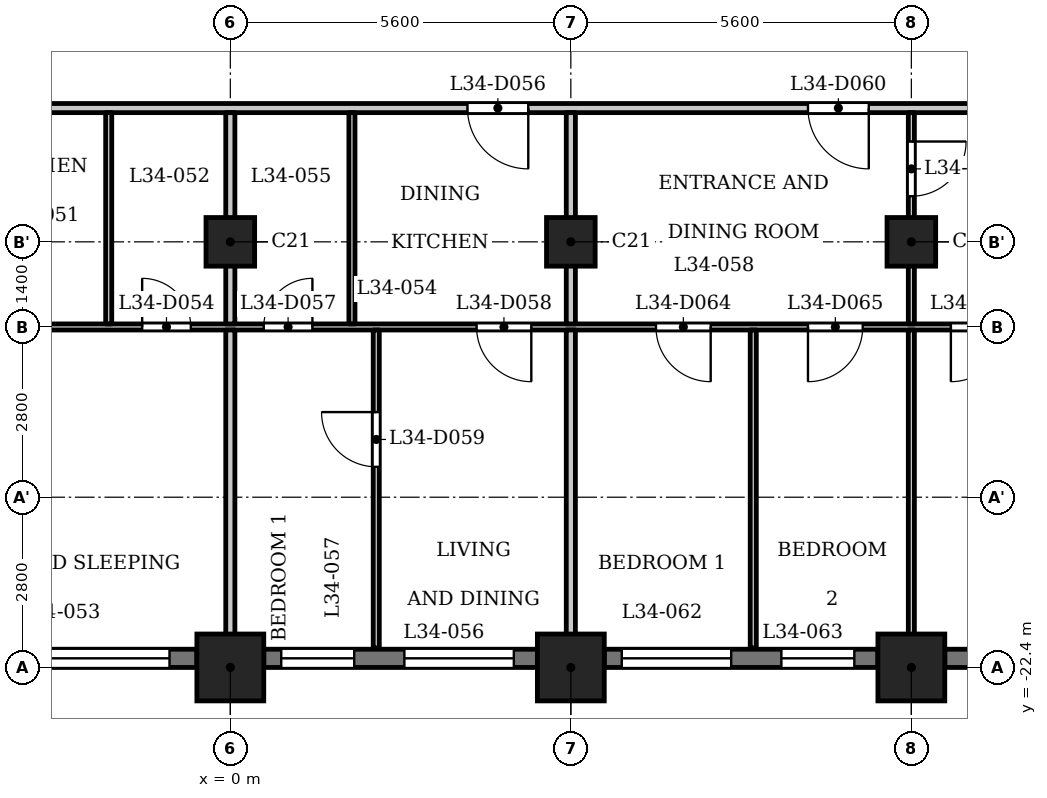
"""IFC4 building model, lengths in metres.
Left out: names, types, materials, properties, quantities, classifications, styles, units other than length and angle.
Written with IfcOpenShell. Run it as: python <this file> out.ifc"""

import sys

from ifc_helpers import new_model, si_unit, direction, frame, frame_2d, origin, origin_2d, place, context, subcontext, project, spatial, rectangle, extrude, element, fill, save


model = new_model("IFC4")
c1 = context("Model", 3, precision=1e-05, world=origin(), true_north=direction((0.0, 1.0)))
c2 = subcontext(c1, "Body", "Model", "MODEL_VIEW")
j1 = project(units=[si_unit("LENGTHUNIT", "METRE"), si_unit("PLANEANGLEUNIT", "RADIAN")], contexts=[c1])
p1 = place(None, origin())
s1 = spatial("IfcSite", under=j1, at=p1, CompositionType="ELEMENT")
p2 = place(p1, origin())
s2 = spatial("IfcBuilding", under=s1, at=p2, CompositionType="ELEMENT")
p3 = place(p2, frame((0.0, 0.0, 136.1)))
s3 = spatial("IfcBuildingStorey", under=s2, at=p3, CompositionType="ELEMENT", Elevation=136.1)
for number, where, z_axis, x_axis in (
    (1, (0.0, -22.4, 0.0), (0.0, 0.0, 1.0), (1.0, 0.0, 0.0)),
    (2, (5.6, -22.4, 0.0), (0.0, 0.0, 1.0), (1.0, 0.0, 0.0)),
    (3, (11.2, -22.4, 0.0), (0.0, 0.0, 1.0), (1.0, 0.0, 0.0)),
):
    element("IfcColumn", number, at=place(p3, frame(where, z_axis=z_axis, x_axis=x_axis)), inside=s3, PredefinedType="COLUMN", context=c2, shape_type="SweptSolid", body=[
        extrude(rectangle(XDim=1.1, YDim=1.1, at=origin_2d()), origin(), (0.0, 0.0, 1.0), 3.5),
    ])
for number, where, z_axis, x_axis in (
    (4, (0.0, -15.4, 0.0), (0.0, 0.0, 1.0), (1.0, 0.0, 0.0)),
    (5, (5.6, -15.4, 0.0), (0.0, 0.0, 1.0), (1.0, 0.0, 0.0)),
    (6, (11.2, -15.4, 0.0), (0.0, 0.0, 1.0), (1.0, 0.0, 0.0)),
):
    element("IfcColumn", number, at=place(p3, frame(where, z_axis=z_axis, x_axis=x_axis)), inside=s3, PredefinedType="COLUMN", context=c2, shape_type="SweptSolid", body=[
        extrude(rectangle(XDim=0.8, YDim=0.8, at=origin_2d()), origin(), (0.0, 0.0, 1.0), 3.5),
    ])
p4 = place(p3, frame((-5.05, -22.25, 0.0), z_axis=(0.0, 0.0, 1.0), x_axis=(1.0, 0.0, 0.0)))
e7 = element("IfcWall", 7, at=p4, inside=s3, PredefinedType="SOLIDWALL", context=c2, shape_type="SweptSolid", body=[
    extrude(rectangle(XDim=4.5, YDim=0.3, at=frame_2d((2.25, 0.0))), origin(), (0.0, 0.0, 1.0), 2.45),
])
p5 = place(p4, frame((0.45, 0.0, 1.2)))
e8 = element("IfcOpeningElement", 8, at=p5, cuts=e7, PredefinedType="OPENING", context=c2, shape_type="SweptSolid", body=[
    extrude(rectangle(XDim=3.6, YDim=0.95, at=frame_2d((1.8, 0.475))), frame((0.0, 0.16, 0.0), z_axis=(0.0, -1.0, 0.0), x_axis=(1.0, 0.0, 0.0)), (0.0, 0.0, 1.0), 0.32),
])
p6 = place(p3, frame((0.55, -22.25, 0.0), z_axis=(0.0, 0.0, 1.0), x_axis=(1.0, 0.0, 0.0)))
e9 = element("IfcWall", 9, at=p6, inside=s3, PredefinedType="SOLIDWALL", context=c2, shape_type="SweptSolid", body=[
    extrude(rectangle(XDim=4.5, YDim=0.3, at=frame_2d((2.25, 0.0))), origin(), (0.0, 0.0, 1.0), 2.45),
])
p7 = place(p6, frame((0.288, 0.0, 0.6)))
e10 = element("IfcOpeningElement", 10, at=p7, cuts=e9, PredefinedType="OPENING", context=c2, shape_type="SweptSolid", body=[
    extrude(rectangle(XDim=1.2, YDim=1.55, at=frame_2d((0.6, 0.775))), frame((0.0, 0.16, 0.0), z_axis=(0.0, -1.0, 0.0), x_axis=(1.0, 0.0, 0.0)), (0.0, 0.0, 1.0), 0.32),
])
p8 = place(p6, frame((2.312, 0.0, 0.9)))
e11 = element("IfcOpeningElement", 11, at=p8, cuts=e9, PredefinedType="OPENING", context=c2, shape_type="SweptSolid", body=[
    extrude(rectangle(XDim=1.8, YDim=1.25, at=frame_2d((0.9, 0.625))), frame((0.0, 0.16, 0.0), z_axis=(0.0, -1.0, 0.0), x_axis=(1.0, 0.0, 0.0)), (0.0, 0.0, 1.0), 0.32),
])
p9 = place(p3, frame((6.15, -22.25, 0.0), z_axis=(0.0, 0.0, 1.0), x_axis=(1.0, 0.0, 0.0)))
e12 = element("IfcWall", 12, at=p9, inside=s3, PredefinedType="SOLIDWALL", context=c2, shape_type="SweptSolid", body=[
    extrude(rectangle(XDim=4.5, YDim=0.3, at=frame_2d((2.25, 0.0))), origin(), (0.0, 0.0, 1.0), 2.45),
])
p10 = place(p9, frame((0.288, 0.0, 0.9)))
e13 = element("IfcOpeningElement", 13, at=p10, cuts=e12, PredefinedType="OPENING", context=c2, shape_type="SweptSolid", body=[
    extrude(rectangle(XDim=1.8, YDim=1.25, at=frame_2d((0.9, 0.625))), frame((0.0, 0.16, 0.0), z_axis=(0.0, -1.0, 0.0), x_axis=(1.0, 0.0, 0.0)), (0.0, 0.0, 1.0), 0.32),
])
p11 = place(p9, frame((2.913, 0.0, 0.6)))
e14 = element("IfcOpeningElement", 14, at=p11, cuts=e12, PredefinedType="OPENING", context=c2, shape_type="SweptSolid", body=[
    extrude(rectangle(XDim=1.2, YDim=1.55, at=frame_2d((0.6, 0.775))), frame((0.0, 0.16, 0.0), z_axis=(0.0, -1.0, 0.0), x_axis=(1.0, 0.0, 0.0)), (0.0, 0.0, 1.0), 0.32),
])
p12 = place(p3, frame((11.75, -22.25, 0.0), z_axis=(0.0, 0.0, 1.0), x_axis=(1.0, 0.0, 0.0)))
e15 = element("IfcWall", 15, at=p12, inside=s3, PredefinedType="SOLIDWALL", context=c2, shape_type="SweptSolid", body=[
    extrude(rectangle(XDim=4.5, YDim=0.3, at=frame_2d((2.25, 0.0))), origin(), (0.0, 0.0, 1.0), 2.45),
])
p13 = place(p12, frame((0.45, 0.0, 1.2)))
e16 = element("IfcOpeningElement", 16, at=p13, cuts=e15, PredefinedType="OPENING", context=c2, shape_type="SweptSolid", body=[
    extrude(rectangle(XDim=3.6, YDim=0.95, at=frame_2d((1.8, 0.475))), frame((0.0, 0.16, 0.0), z_axis=(0.0, -1.0, 0.0), x_axis=(1.0, 0.0, 0.0)), (0.0, 0.0, 1.0), 0.32),
])
p14 = place(p3, frame((-16.725, -16.8, 0.0), z_axis=(0.0, 0.0, 1.0), x_axis=(1.0, 0.0, 0.0)))
e17 = element("IfcWall", 17, at=p14, inside=s3, PredefinedType="PARTITIONING", context=c2, shape_type="SweptSolid", body=[
    extrude(rectangle(XDim=33.45, YDim=0.1, at=frame_2d((16.725, 0.0))), origin(), (0.0, 0.0, 1.0), 3.2),
])
p15 = place(p14, frame((0.575, 0.0, 0.0)))
e18 = element("IfcOpeningElement", 18, at=p15, cuts=e17, PredefinedType="OPENING", context=c2, shape_type="SweptSolid", body=[
    extrude(rectangle(XDim=0.8, YDim=2.1, at=frame_2d((0.4, 1.05))), frame((0.0, 0.06, 0.0), z_axis=(0.0, -1.0, 0.0), x_axis=(1.0, 0.0, 0.0)), (0.0, 0.0, 1.0), 0.12),
])
p16 = place(p14, frame((6.175, 0.0, 0.0)))
e19 = element("IfcOpeningElement", 19, at=p16, cuts=e17, PredefinedType="OPENING", context=c2, shape_type="SweptSolid", body=[
    extrude(rectangle(XDim=0.9, YDim=2.1, at=frame_2d((0.45, 1.05))), frame((0.0, 0.06, 0.0), z_axis=(0.0, -1.0, 0.0), x_axis=(1.0, 0.0, 0.0)), (0.0, 0.0, 1.0), 0.12),
])
p17 = place(p14, frame((15.275, 0.0, 0.0)))
e20 = element("IfcOpeningElement", 20, at=p17, cuts=e17, PredefinedType="OPENING", context=c2, shape_type="SweptSolid", body=[
    extrude(rectangle(XDim=0.8, YDim=2.1, at=frame_2d((0.4, 1.05))), frame((0.0, 0.06, 0.0), z_axis=(0.0, -1.0, 0.0), x_axis=(1.0, 0.0, 0.0)), (0.0, 0.0, 1.0), 0.12),
])
p18 = place(p14, frame((11.775, 0.0, 0.0)))
e21 = element("IfcOpeningElement", 21, at=p18, cuts=e17, PredefinedType="OPENING", context=c2, shape_type="SweptSolid", body=[
    extrude(rectangle(XDim=0.9, YDim=2.1, at=frame_2d((0.45, 1.05))), frame((0.0, 0.06, 0.0), z_axis=(0.0, -1.0, 0.0), x_axis=(1.0, 0.0, 0.0)), (0.0, 0.0, 1.0), 0.12),
])
p19 = place(p14, frame((17.275, 0.0, 0.0)))
e22 = element("IfcOpeningElement", 22, at=p19, cuts=e17, PredefinedType="OPENING", context=c2, shape_type="SweptSolid", body=[
    extrude(rectangle(XDim=0.8, YDim=2.1, at=frame_2d((0.4, 1.05))), frame((0.0, 0.06, 0.0), z_axis=(0.0, -1.0, 0.0), x_axis=(1.0, 0.0, 0.0)), (0.0, 0.0, 1.0), 0.12),
])
p20 = place(p14, frame((20.775, 0.0, 0.0)))
e23 = element("IfcOpeningElement", 23, at=p20, cuts=e17, PredefinedType="OPENING", context=c2, shape_type="SweptSolid", body=[
    extrude(rectangle(XDim=0.9, YDim=2.1, at=frame_2d((0.45, 1.05))), frame((0.0, 0.06, 0.0), z_axis=(0.0, -1.0, 0.0), x_axis=(1.0, 0.0, 0.0)), (0.0, 0.0, 1.0), 0.12),
])
p21 = place(p14, frame((31.575, 0.0, 0.0)))
e24 = element("IfcOpeningElement", 24, at=p21, cuts=e17, PredefinedType="OPENING", context=c2, shape_type="SweptSolid", body=[
    extrude(rectangle(XDim=0.8, YDim=2.1, at=frame_2d((0.4, 1.05))), frame((0.0, 0.06, 0.0), z_axis=(0.0, -1.0, 0.0), x_axis=(1.0, 0.0, 0.0)), (0.0, 0.0, 1.0), 0.12),
])
p22 = place(p14, frame((28.575, 0.0, 0.0)))
e25 = element("IfcOpeningElement", 25, at=p22, cuts=e17, PredefinedType="OPENING", context=c2, shape_type="SweptSolid", body=[
    extrude(rectangle(XDim=0.9, YDim=2.1, at=frame_2d((0.45, 1.05))), frame((0.0, 0.06, 0.0), z_axis=(0.0, -1.0, 0.0), x_axis=(1.0, 0.0, 0.0)), (0.0, 0.0, 1.0), 0.12),
])
p23 = place(p14, frame((23.725, 0.0, 0.0)))
e26 = element("IfcOpeningElement", 26, at=p23, cuts=e17, PredefinedType="OPENING", context=c2, shape_type="SweptSolid", body=[
    extrude(rectangle(XDim=0.9, YDim=2.1, at=frame_2d((0.45, 1.05))), frame((0.0, 0.06, 0.0), z_axis=(0.0, -1.0, 0.0), x_axis=(1.0, 0.0, 0.0)), (0.0, 0.0, 1.0), 0.12),
])
p24 = place(p14, frame((26.225, 0.0, 0.0)))
e27 = element("IfcOpeningElement", 27, at=p24, cuts=e17, PredefinedType="OPENING", context=c2, shape_type="SweptSolid", body=[
    extrude(rectangle(XDim=0.9, YDim=2.1, at=frame_2d((0.45, 1.05))), frame((0.0, 0.06, 0.0), z_axis=(0.0, -1.0, 0.0), x_axis=(1.0, 0.0, 0.0)), (0.0, 0.0, 1.0), 0.12),
])
p25 = place(p3, frame((-17.4, -13.2, 0.0), z_axis=(0.0, 0.0, 1.0), x_axis=(1.0, 0.0, 0.0)))
e28 = element("IfcWall", 28, at=p25, inside=s3, PredefinedType="PARTITIONING", context=c2, shape_type="SweptSolid", body=[
    extrude(rectangle(XDim=34.8, YDim=0.15, at=frame_2d((17.4, 0.0))), origin(), (0.0, 0.0, 1.0), 3.2),
])
p26 = place(p25, frame((0.15, 0.0, 0.0)))
e29 = element("IfcOpeningElement", 29, at=p26, cuts=e28, PredefinedType="OPENING", context=c2, shape_type="SweptSolid", body=[
    extrude(rectangle(XDim=1.0, YDim=2.1, at=frame_2d((0.5, 1.05))), frame((0.0, 0.085, 0.0), z_axis=(0.0, -1.0, 0.0), x_axis=(1.0, 0.0, 0.0)), (0.0, 0.0, 1.0), 0.17),
])
p27 = place(p25, frame((33.55, 0.0, 0.0)))
e30 = element("IfcOpeningElement", 30, at=p27, cuts=e28, PredefinedType="OPENING", context=c2, shape_type="SweptSolid", body=[
    extrude(rectangle(XDim=1.0, YDim=2.1, at=frame_2d((0.5, 1.05))), frame((0.0, 0.085, 0.0), z_axis=(0.0, -1.0, 0.0), x_axis=(1.0, 0.0, 0.0)), (0.0, 0.0, 1.0), 0.17),
])
p28 = place(p25, frame((6.85, 0.0, 0.0)))
e31 = element("IfcOpeningElement", 31, at=p28, cuts=e28, PredefinedType="OPENING", context=c2, shape_type="SweptSolid", body=[
    extrude(rectangle(XDim=1.0, YDim=2.1, at=frame_2d((0.5, 1.05))), frame((0.0, 0.085, 0.0), z_axis=(0.0, -1.0, 0.0), x_axis=(1.0, 0.0, 0.0)), (0.0, 0.0, 1.0), 0.17),
])
p29 = place(p25, frame((12.45, 0.0, 0.0)))
e32 = element("IfcOpeningElement", 32, at=p29, cuts=e28, PredefinedType="OPENING", context=c2, shape_type="SweptSolid", body=[
    extrude(rectangle(XDim=1.0, YDim=2.1, at=frame_2d((0.5, 1.05))), frame((0.0, 0.085, 0.0), z_axis=(0.0, -1.0, 0.0), x_axis=(1.0, 0.0, 0.0)), (0.0, 0.0, 1.0), 0.17),
])
p30 = place(p25, frame((21.3, 0.0, 0.0)))
e33 = element("IfcOpeningElement", 33, at=p30, cuts=e28, PredefinedType="OPENING", context=c2, shape_type="SweptSolid", body=[
    extrude(rectangle(XDim=1.0, YDim=2.1, at=frame_2d((0.5, 1.05))), frame((0.0, 0.085, 0.0), z_axis=(0.0, -1.0, 0.0), x_axis=(1.0, 0.0, 0.0)), (0.0, 0.0, 1.0), 0.17),
])
p31 = place(p25, frame((26.9, 0.0, 0.0)))
e34 = element("IfcOpeningElement", 34, at=p31, cuts=e28, PredefinedType="OPENING", context=c2, shape_type="SweptSolid", body=[
    extrude(rectangle(XDim=1.0, YDim=2.1, at=frame_2d((0.5, 1.05))), frame((0.0, 0.085, 0.0), z_axis=(0.0, -1.0, 0.0), x_axis=(1.0, 0.0, 0.0)), (0.0, 0.0, 1.0), 0.17),
])
p32 = place(p3, frame((-2.0, -16.75, 0.0), z_axis=(0.0, 0.0, 1.0), x_axis=(0.0, 1.0, 0.0)))
e35 = element("IfcWall", 35, at=p32, inside=s3, PredefinedType="PARTITIONING", context=c2, shape_type="SweptSolid", body=[
    extrude(rectangle(XDim=3.475, YDim=0.1, at=frame_2d((1.738, 0.0))), origin(), (0.0, 0.0, 1.0), 3.2),
])
p33 = place(p3, frame((0.0, -22.93, 0.0), z_axis=(0.0, 0.0, 1.0), x_axis=(0.0, 1.0, 0.0)))
e36 = element("IfcWall", 36, at=p33, inside=s3, PredefinedType="PARTITIONING", context=c2, shape_type="SweptSolid", body=[
    extrude(rectangle(XDim=6.08, YDim=0.15, at=frame_2d((3.04, 0.0))), origin(), (0.0, 0.0, 1.0), 3.2),
])
p34 = place(p3, frame((0.0, -16.75, 0.0), z_axis=(0.0, 0.0, 1.0), x_axis=(0.0, 1.0, 0.0)))
e37 = element("IfcWall", 37, at=p34, inside=s3, PredefinedType="PARTITIONING", context=c2, shape_type="SweptSolid", body=[
    extrude(rectangle(XDim=3.475, YDim=0.15, at=frame_2d((1.738, 0.0))), origin(), (0.0, 0.0, 1.0), 3.2),
])
p35 = place(p3, frame((2.0, -16.75, 0.0), z_axis=(0.0, 0.0, 1.0), x_axis=(0.0, 1.0, 0.0)))
e38 = element("IfcWall", 38, at=p35, inside=s3, PredefinedType="PARTITIONING", context=c2, shape_type="SweptSolid", body=[
    extrude(rectangle(XDim=3.475, YDim=0.1, at=frame_2d((1.738, 0.0))), origin(), (0.0, 0.0, 1.0), 3.2),
])
p36 = place(p3, frame((2.4, -22.08, 0.0), z_axis=(0.0, 0.0, 1.0), x_axis=(0.0, 1.0, 0.0)))
e39 = element("IfcWall", 39, at=p36, inside=s3, PredefinedType="PARTITIONING", context=c2, shape_type="SweptSolid", body=[
    extrude(rectangle(XDim=5.23, YDim=0.1, at=frame_2d((2.615, 0.0))), origin(), (0.0, 0.0, 1.0), 3.2),
])
p37 = place(p36, frame((2.98, 0.0, 0.0)))
e40 = element("IfcOpeningElement", 40, at=p37, cuts=e39, PredefinedType="OPENING", context=c2, shape_type="SweptSolid", body=[
    extrude(rectangle(XDim=0.9, YDim=2.1, at=frame_2d((0.45, 1.05))), frame((0.0, 0.06, 0.0), z_axis=(0.0, -1.0, 0.0), x_axis=(1.0, 0.0, 0.0)), (0.0, 0.0, 1.0), 0.12),
])
p38 = place(p3, frame((5.6, -22.93, 0.0), z_axis=(0.0, 0.0, 1.0), x_axis=(0.0, 1.0, 0.0)))
e41 = element("IfcWall", 41, at=p38, inside=s3, PredefinedType="PARTITIONING", context=c2, shape_type="SweptSolid", body=[
    extrude(rectangle(XDim=6.08, YDim=0.15, at=frame_2d((3.04, 0.0))), origin(), (0.0, 0.0, 1.0), 3.2),
])
p39 = place(p3, frame((5.6, -16.75, 0.0), z_axis=(0.0, 0.0, 1.0), x_axis=(0.0, 1.0, 0.0)))
e42 = element("IfcWall", 42, at=p39, inside=s3, PredefinedType="PARTITIONING", context=c2, shape_type="SweptSolid", body=[
    extrude(rectangle(XDim=3.475, YDim=0.15, at=frame_2d((1.738, 0.0))), origin(), (0.0, 0.0, 1.0), 3.2),
])
p40 = place(p3, frame((8.6, -22.08, 0.0), z_axis=(0.0, 0.0, 1.0), x_axis=(0.0, 1.0, 0.0)))
e43 = element("IfcWall", 43, at=p40, inside=s3, PredefinedType="PARTITIONING", context=c2, shape_type="SweptSolid", body=[
    extrude(rectangle(XDim=5.23, YDim=0.1, at=frame_2d((2.615, 0.0))), origin(), (0.0, 0.0, 1.0), 3.2),
])
p41 = place(p3, frame((11.2, -22.93, 0.0), z_axis=(0.0, 0.0, 1.0), x_axis=(0.0, 1.0, 0.0)))
e44 = element("IfcWall", 44, at=p41, inside=s3, PredefinedType="PARTITIONING", context=c2, shape_type="SweptSolid", body=[
    extrude(rectangle(XDim=6.08, YDim=0.1, at=frame_2d((3.04, 0.0))), origin(), (0.0, 0.0, 1.0), 3.2),
])
p42 = place(p3, frame((11.2, -16.75, 0.0), z_axis=(0.0, 0.0, 1.0), x_axis=(0.0, 1.0, 0.0)))
e45 = element("IfcWall", 45, at=p42, inside=s3, PredefinedType="PARTITIONING", context=c2, shape_type="SweptSolid", body=[
    extrude(rectangle(XDim=3.475, YDim=0.1, at=frame_2d((1.738, 0.0))), origin(), (0.0, 0.0, 1.0), 3.2),
])
p43 = place(p42, frame((2.1, 0.0, 0.0)))
e46 = element("IfcOpeningElement", 46, at=p43, cuts=e45, PredefinedType="OPENING", context=c2, shape_type="SweptSolid", body=[
    extrude(rectangle(XDim=0.9, YDim=2.1, at=frame_2d((0.45, 1.05))), frame((0.0, 0.06, 0.0), z_axis=(0.0, -1.0, 0.0), x_axis=(1.0, 0.0, 0.0)), (0.0, 0.0, 1.0), 0.12),
])
p44 = place(p17, origin())
e47 = element("IfcDoor", 47, at=p44, inside=s3, OperationType="SINGLE_SWING_RIGHT", PredefinedType="DOOR", context=c2, shape_type="SweptSolid", body=[
    extrude(rectangle(XDim=0.8, YDim=2.1, at=frame_2d((0.4, 1.05))), frame((0.0, 0.025, 0.0), z_axis=(0.0, -1.0, 0.0), x_axis=(1.0, 0.0, 0.0)), (0.0, 0.0, 1.0), 0.05),
])
fill(e20, e47)
p45 = place(p30, origin())
e48 = element("IfcDoor", 48, at=p45, inside=s3, OperationType="SINGLE_SWING_RIGHT", PredefinedType="DOOR", context=c2, shape_type="SweptSolid", body=[
    extrude(rectangle(XDim=1.0, YDim=2.1, at=frame_2d((0.5, 1.05))), frame((0.0, 0.025, 0.0), z_axis=(0.0, -1.0, 0.0), x_axis=(1.0, 0.0, 0.0)), (0.0, 0.0, 1.0), 0.05),
])
fill(e33, e48)
p46 = place(p19, origin())
e49 = element("IfcDoor", 49, at=p46, inside=s3, OperationType="SINGLE_SWING_LEFT", PredefinedType="DOOR", context=c2, shape_type="SweptSolid", body=[
    extrude(rectangle(XDim=0.8, YDim=2.1, at=frame_2d((0.4, 1.05))), frame((0.0, 0.025, 0.0), z_axis=(0.0, -1.0, 0.0), x_axis=(1.0, 0.0, 0.0)), (0.0, 0.0, 1.0), 0.05),
])
fill(e22, e49)
p47 = place(p20, origin())
e50 = element("IfcDoor", 50, at=p47, inside=s3, OperationType="SINGLE_SWING_RIGHT", PredefinedType="DOOR", context=c2, shape_type="SweptSolid", body=[
    extrude(rectangle(XDim=0.9, YDim=2.1, at=frame_2d((0.45, 1.05))), frame((0.0, 0.025, 0.0), z_axis=(0.0, -1.0, 0.0), x_axis=(1.0, 0.0, 0.0)), (0.0, 0.0, 1.0), 0.05),
])
fill(e23, e50)
p48 = place(p37, origin())
e51 = element("IfcDoor", 51, at=p48, inside=s3, OperationType="SINGLE_SWING_LEFT", PredefinedType="DOOR", context=c2, shape_type="SweptSolid", body=[
    extrude(rectangle(XDim=0.9, YDim=2.1, at=frame_2d((0.45, 1.05))), frame((0.0, 0.025, 0.0), z_axis=(0.0, -1.0, 0.0), x_axis=(1.0, 0.0, 0.0)), (0.0, 0.0, 1.0), 0.05),
])
fill(e40, e51)
p49 = place(p31, origin())
e52 = element("IfcDoor", 52, at=p49, inside=s3, OperationType="SINGLE_SWING_RIGHT", PredefinedType="DOOR", context=c2, shape_type="SweptSolid", body=[
    extrude(rectangle(XDim=1.0, YDim=2.1, at=frame_2d((0.5, 1.05))), frame((0.0, 0.025, 0.0), z_axis=(0.0, -1.0, 0.0), x_axis=(1.0, 0.0, 0.0)), (0.0, 0.0, 1.0), 0.05),
])
fill(e34, e52)
p50 = place(p43, origin())
e53 = element("IfcDoor", 53, at=p50, inside=s3, OperationType="SINGLE_SWING_RIGHT", PredefinedType="DOOR", context=c2, shape_type="SweptSolid", body=[
    extrude(rectangle(XDim=0.9, YDim=2.1, at=frame_2d((0.45, 1.05))), frame((0.0, 0.025, 0.0), z_axis=(0.0, -1.0, 0.0), x_axis=(1.0, 0.0, 0.0)), (0.0, 0.0, 1.0), 0.05),
])
fill(e46, e53)
p51 = place(p22, origin())
e54 = element("IfcDoor", 54, at=p51, inside=s3, OperationType="SINGLE_SWING_LEFT", PredefinedType="DOOR", context=c2, shape_type="SweptSolid", body=[
    extrude(rectangle(XDim=0.9, YDim=2.1, at=frame_2d((0.45, 1.05))), frame((0.0, 0.025, 0.0), z_axis=(0.0, -1.0, 0.0), x_axis=(1.0, 0.0, 0.0)), (0.0, 0.0, 1.0), 0.05),
])
fill(e25, e54)
p52 = place(p23, origin())
e55 = element("IfcDoor", 55, at=p52, inside=s3, OperationType="SINGLE_SWING_RIGHT", PredefinedType="DOOR", context=c2, shape_type="SweptSolid", body=[
    extrude(rectangle(XDim=0.9, YDim=2.1, at=frame_2d((0.45, 1.05))), frame((0.0, 0.025, 0.0), z_axis=(0.0, -1.0, 0.0), x_axis=(1.0, 0.0, 0.0)), (0.0, 0.0, 1.0), 0.05),
])
fill(e26, e55)
p53 = place(p24, origin())
e56 = element("IfcDoor", 56, at=p53, inside=s3, OperationType="SINGLE_SWING_LEFT", PredefinedType="DOOR", context=c2, shape_type="SweptSolid", body=[
    extrude(rectangle(XDim=0.9, YDim=2.1, at=frame_2d((0.45, 1.05))), frame((0.0, 0.025, 0.0), z_axis=(0.0, -1.0, 0.0), x_axis=(1.0, 0.0, 0.0)), (0.0, 0.0, 1.0), 0.05),
])
fill(e27, e56)
p54 = place(p5, origin())
e57 = element("IfcWindow", 57, at=p54, inside=s3, PartitioningType="SINGLE_PANEL", PredefinedType="WINDOW", context=c2, shape_type="SweptSolid", body=[
    extrude(rectangle(XDim=3.6, YDim=0.95, at=frame_2d((1.8, 0.475))), frame((0.0, 0.03, 0.0), z_axis=(0.0, -1.0, 0.0), x_axis=(1.0, 0.0, 0.0)), (0.0, 0.0, 1.0), 0.06),
])
fill(e8, e57)
p55 = place(p7, origin())
e58 = element("IfcWindow", 58, at=p55, inside=s3, PartitioningType="SINGLE_PANEL", PredefinedType="WINDOW", context=c2, shape_type="SweptSolid", body=[
    extrude(rectangle(XDim=1.2, YDim=1.55, at=frame_2d((0.6, 0.775))), frame((0.0, 0.03, 0.0), z_axis=(0.0, -1.0, 0.0), x_axis=(1.0, 0.0, 0.0)), (0.0, 0.0, 1.0), 0.06),
])
fill(e10, e58)
p56 = place(p8, origin())
e59 = element("IfcWindow", 59, at=p56, inside=s3, PartitioningType="SINGLE_PANEL", PredefinedType="WINDOW", context=c2, shape_type="SweptSolid", body=[
    extrude(rectangle(XDim=1.8, YDim=1.25, at=frame_2d((0.9, 0.625))), frame((0.0, 0.03, 0.0), z_axis=(0.0, -1.0, 0.0), x_axis=(1.0, 0.0, 0.0)), (0.0, 0.0, 1.0), 0.06),
])
fill(e11, e59)
p57 = place(p10, origin())
e60 = element("IfcWindow", 60, at=p57, inside=s3, PartitioningType="SINGLE_PANEL", PredefinedType="WINDOW", context=c2, shape_type="SweptSolid", body=[
    extrude(rectangle(XDim=1.8, YDim=1.25, at=frame_2d((0.9, 0.625))), frame((0.0, 0.03, 0.0), z_axis=(0.0, -1.0, 0.0), x_axis=(1.0, 0.0, 0.0)), (0.0, 0.0, 1.0), 0.06),
])
fill(e13, e60)
p58 = place(p11, origin())
e61 = element("IfcWindow", 61, at=p58, inside=s3, PartitioningType="SINGLE_PANEL", PredefinedType="WINDOW", context=c2, shape_type="SweptSolid", body=[
    extrude(rectangle(XDim=1.2, YDim=1.55, at=frame_2d((0.6, 0.775))), frame((0.0, 0.03, 0.0), z_axis=(0.0, -1.0, 0.0), x_axis=(1.0, 0.0, 0.0)), (0.0, 0.0, 1.0), 0.06),
])
fill(e14, e61)
save(model, sys.argv[1])
